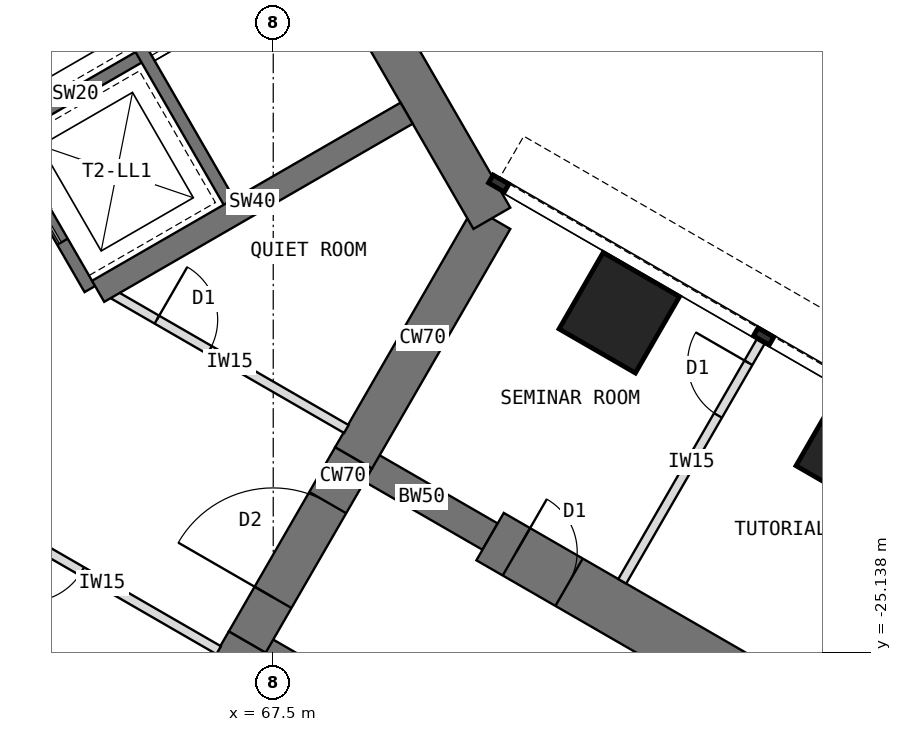
"""IFC4 building model, lengths in metres.
Left out: names, types, materials, properties, quantities, classifications, styles, units other than length and angle.
Written with IfcOpenShell. Run it as: python <this file> out.ifc"""

import sys

from ifc_helpers import new_model, si_unit, direction, frame, frame_2d, origin, origin_2d, place, context, subcontext, project, spatial, rectangle, extrude, element, fill, save


model = new_model("IFC4")
c1 = context("Model", 3, precision=1e-05, world=origin(), true_north=direction((0.0, 1.0)))
c2 = subcontext(c1, "Body", "Model", "MODEL_VIEW")
j1 = project(units=[si_unit("LENGTHUNIT", "METRE"), si_unit("PLANEANGLEUNIT", "RADIAN")], contexts=[c1])
p1 = place(None, origin())
s1 = spatial("IfcSite", under=j1, at=p1, CompositionType="ELEMENT")
p2 = place(p1, origin())
s2 = spatial("IfcBuilding", under=s1, at=p2, CompositionType="ELEMENT")
p3 = place(p2, frame((0.0, 0.0, 60.5)))
s3 = spatial("IfcBuildingStorey", under=s2, at=p3, CompositionType="ELEMENT", Elevation=60.5)
p4 = place(p3, frame((64.798, -28.908, 0.0), z_axis=(0.0, 0.0, 1.0), x_axis=(0.499984222037, 0.866034513004, 0.0)))
e1 = element("IfcWall", 1, at=p4, inside=s3, PredefinedType="SHEAR", context=c2, shape_type="SweptSolid", body=[
    extrude(rectangle(XDim=4.548, YDim=0.7, at=frame_2d((2.274, 0.0))), origin(), (0.0, 0.0, 1.0), 4.0),
])
p5 = place(p3, frame((67.072, -24.97, 0.0), z_axis=(0.0, 0.0, 1.0), x_axis=(0.500010275428, 0.866019471182, 0.0)))
e2 = element("IfcWall", 2, at=p5, inside=s3, PredefinedType="SHEAR", context=c2, shape_type="SweptSolid", body=[
    extrude(rectangle(XDim=3.5, YDim=0.7, at=frame_2d((1.75, 0.0))), origin(), (0.0, 0.0, 1.0), 4.0),
])
p6 = place(p5, frame((0.85, 0.0, 0.0)))
e3 = element("IfcOpeningElement", 3, at=p6, cuts=e2, PredefinedType="OPENING", context=c2, shape_type="SweptSolid", body=[
    extrude(rectangle(XDim=1.8, YDim=2.1, at=frame_2d((0.9, 1.05))), frame((0.0, 0.36, 0.0), z_axis=(0.0, -1.0, 0.0), x_axis=(1.0, 0.0, 0.0)), (0.0, 0.0, 1.0), 0.72),
])
p7 = place(p3, frame((68.822, -21.939, 0.0), z_axis=(0.0, 0.0, 1.0), x_axis=(0.500024481964, 0.866011268655, 0.0)))
e4 = element("IfcWall", 4, at=p7, inside=s3, PredefinedType="SHEAR", context=c2, shape_type="SweptSolid", body=[
    extrude(rectangle(XDim=4.548, YDim=0.7, at=frame_2d((2.274, 0.0))), origin(), (0.0, 0.0, 1.0), 4.0),
])
p8 = place(p3, frame((71.096, -18.0, 0.0), z_axis=(0.0, 0.0, 1.0), x_axis=(-0.500005998175, 0.866021940709, 0.0)))
e5 = element("IfcWall", 5, at=p8, inside=s3, PredefinedType="SHEAR", context=c2, shape_type="SweptSolid", body=[
    extrude(rectangle(XDim=12.596, YDim=0.7, at=frame_2d((6.298, 0.0))), origin(), (0.0, 0.0, 1.0), 4.0),
])
p9 = place(p3, frame((68.822, -21.939, 0.0), z_axis=(0.0, 0.0, 1.0), x_axis=(0.866072649678, -0.499918158782, 0.0)))
e6 = element("IfcWall", 6, at=p9, inside=s3, PredefinedType="SHEAR", context=c2, shape_type="SweptSolid", body=[
    extrude(rectangle(XDim=2.592, YDim=0.5, at=frame_2d((1.296, 0.0))), origin(), (0.0, 0.0, 1.0), 4.0),
])
p10 = place(p3, frame((71.066, -23.234, 0.0), z_axis=(0.0, 0.0, 1.0), x_axis=(0.86602681393, -0.499997557548, 0.0)))
e7 = element("IfcWall", 7, at=p10, inside=s3, PredefinedType="SHEAR", context=c2, shape_type="SweptSolid", body=[
    extrude(rectangle(XDim=9.5, YDim=0.9, at=frame_2d((4.75, 0.0))), origin(), (0.0, 0.0, 1.0), 4.0),
])
p11 = place(p10, frame((0.5, 0.0, 0.0)))
e8 = element("IfcOpeningElement", 8, at=p11, cuts=e7, PredefinedType="OPENING", context=c2, shape_type="SweptSolid", body=[
    extrude(rectangle(XDim=1.0, YDim=2.1, at=frame_2d((0.5, 1.05))), frame((0.0, 0.46, 0.0), z_axis=(0.0, -1.0, 0.0), x_axis=(1.0, 0.0, 0.0)), (0.0, 0.0, 1.0), 0.92),
])
p12 = place(p10, frame((7.25, 0.0, 0.0)))
e9 = element("IfcOpeningElement", 9, at=p12, cuts=e7, PredefinedType="OPENING", context=c2, shape_type="SweptSolid", body=[
    extrude(rectangle(XDim=1.0, YDim=2.1, at=frame_2d((0.5, 1.05))), frame((0.0, 0.46, 0.0), z_axis=(0.0, -1.0, 0.0), x_axis=(1.0, 0.0, 0.0)), (0.0, 0.0, 1.0), 0.92),
])
p13 = place(p3, frame((67.072, -24.97, 0.0), z_axis=(0.0, 0.0, 1.0), x_axis=(0.866031863473, -0.499988811324, 0.0)))
e10 = element("IfcWall", 10, at=p13, inside=s3, PredefinedType="SHEAR", context=c2, shape_type="SweptSolid", body=[
    extrude(rectangle(XDim=2.592, YDim=0.5, at=frame_2d((1.296, 0.0))), origin(), (0.0, 0.0, 1.0), 4.0),
])
for number, where, z_axis, x_axis in (
    (11, (73.191, -19.554, 0.0), (0.0, 0.0, 1.0), (0.5, 0.866, 0.0)),
    (12, (77.088, -21.804, 0.0), (0.0, 0.0, 1.0), (0.5, 0.866, 0.0)),
):
    element("IfcColumn", number, at=place(p3, frame(where, z_axis=z_axis, x_axis=x_axis)), inside=s3, PredefinedType="COLUMN", context=c2, shape_type="SweptSolid", body=[
        extrude(rectangle(XDim=1.45, YDim=1.45, at=origin_2d()), origin(), (0.0, 0.0, 1.0), 4.0),
    ])
p14 = place(p3, frame((64.484, -19.164, 0.0), z_axis=(0.0, 0.0, 1.0), x_axis=(-0.49999894854, 0.866026010844, 0.0)))
e13 = element("IfcWall", 13, at=p14, inside=s3, PredefinedType="SHEAR", context=c2, shape_type="SweptSolid", body=[
    extrude(rectangle(XDim=8.0, YDim=0.2, at=frame_2d((4.0, 0.0))), origin(), (0.0, 0.0, 1.0), 4.0),
])
p15 = place(p14, frame((6.3, 0.0, 0.0)))
e14 = element("IfcOpeningElement", 14, at=p15, cuts=e13, PredefinedType="OPENING", context=c2, shape_type="SweptSolid", body=[
    extrude(rectangle(XDim=1.2, YDim=2.1, at=frame_2d((0.6, 1.05))), frame((0.0, 0.11, 0.0), z_axis=(0.0, -1.0, 0.0), x_axis=(1.0, 0.0, 0.0)), (0.0, 0.0, 1.0), 0.22),
])
p16 = place(p14, frame((0.9, 0.0, 0.0)))
e15 = element("IfcOpeningElement", 15, at=p16, cuts=e13, PredefinedType="OPENING", context=c2, shape_type="SweptSolid", body=[
    extrude(rectangle(XDim=1.1, YDim=2.2, at=frame_2d((0.55, 1.1))), frame((0.0, 0.11, 0.0), z_axis=(0.0, -1.0, 0.0), x_axis=(1.0, 0.0, 0.0)), (0.0, 0.0, 1.0), 0.22),
])
p17 = place(p14, frame((3.8, 0.0, 0.0)))
e16 = element("IfcOpeningElement", 16, at=p17, cuts=e13, PredefinedType="OPENING", context=c2, shape_type="SweptSolid", body=[
    extrude(rectangle(XDim=1.1, YDim=2.2, at=frame_2d((0.55, 1.1))), frame((0.0, 0.11, 0.0), z_axis=(0.0, -1.0, 0.0), x_axis=(1.0, 0.0, 0.0)), (0.0, 0.0, 1.0), 0.22),
])
p18 = place(p3, frame((63.12, -16.603, 0.0), z_axis=(0.0, 0.0, 1.0), x_axis=(0.866062058628, 0.499936506574, 0.0)))
e17 = element("IfcWall", 17, at=p18, inside=s3, PredefinedType="SHEAR", context=c2, shape_type="SweptSolid", body=[
    extrude(rectangle(XDim=2.6, YDim=0.2, at=frame_2d((1.3, 0.0))), origin(), (0.0, 0.0, 1.0), 4.0),
])
p19 = place(p3, frame((66.822, -17.814, 0.0), z_axis=(0.0, 0.0, 1.0), x_axis=(-0.49999894854, 0.866026010844, 0.0)))
e18 = element("IfcWall", 18, at=p19, inside=s3, PredefinedType="SHEAR", context=c2, shape_type="SweptSolid", body=[
    extrude(rectangle(XDim=8.0, YDim=0.2, at=frame_2d((4.0, 0.0))), origin(), (0.0, 0.0, 1.0), 4.0),
])
p20 = place(p19, frame((6.7, 0.0, 0.0)))
e19 = element("IfcOpeningElement", 19, at=p20, cuts=e18, PredefinedType="OPENING", context=c2, shape_type="SweptSolid", body=[
    extrude(rectangle(XDim=1.1, YDim=2.1, at=frame_2d((0.55, 1.05))), frame((0.0, 0.11, 0.0), z_axis=(0.0, -1.0, 0.0), x_axis=(1.0, 0.0, 0.0)), (0.0, 0.0, 1.0), 0.22),
])
p21 = place(p3, frame((64.62, -19.201, 0.0), z_axis=(0.0, 0.0, 1.0), x_axis=(0.866023886965, 0.500002627198, 0.0)))
e20 = element("IfcWall", 20, at=p21, inside=s3, PredefinedType="SHEAR", context=c2, shape_type="SweptSolid", body=[
    extrude(rectangle(XDim=5.858, YDim=0.4, at=frame_2d((2.929, 0.0))), origin(), (0.0, 0.0, 1.0), 4.0),
])
p22 = place(p3, frame((73.24, -23.97, 0.0), z_axis=(0.0, 0.0, 1.0), x_axis=(0.499982560684, 0.866035472144, 0.0)))
e21 = element("IfcWall", 21, at=p22, inside=s3, PredefinedType="PARTITIONING", context=c2, shape_type="SweptSolid", body=[
    extrude(rectangle(XDim=4.55, YDim=0.15, at=frame_2d((2.275, 0.0))), origin(), (0.0, 0.0, 1.0), 3.8),
])
p23 = place(p22, frame((3.15, 0.0, 0.0)))
e22 = element("IfcOpeningElement", 22, at=p23, cuts=e21, PredefinedType="OPENING", context=c2, shape_type="SweptSolid", body=[
    extrude(rectangle(XDim=1.0, YDim=2.1, at=frame_2d((0.5, 1.05))), frame((0.0, 0.085, 0.0), z_axis=(0.0, -1.0, 0.0), x_axis=(1.0, 0.0, 0.0)), (0.0, 0.0, 1.0), 0.17),
])
p24 = place(p3, frame((64.87, -19.253, 0.0), z_axis=(0.0, 0.0, 1.0), x_axis=(0.866021148949, -0.500007369519, 0.0)))
e23 = element("IfcWall", 23, at=p24, inside=s3, PredefinedType="PARTITIONING", context=c2, shape_type="SweptSolid", body=[
    extrude(rectangle(XDim=4.426, YDim=0.15, at=frame_2d((2.213, 0.0))), origin(), (0.0, 0.0, 1.0), 3.8),
])
p25 = place(p24, frame((0.828, 0.0, 0.0)))
e24 = element("IfcOpeningElement", 24, at=p25, cuts=e23, PredefinedType="OPENING", context=c2, shape_type="SweptSolid", body=[
    extrude(rectangle(XDim=1.0, YDim=2.1, at=frame_2d((0.5, 1.05))), frame((0.0, 0.085, 0.0), z_axis=(0.0, -1.0, 0.0), x_axis=(1.0, 0.0, 0.0)), (0.0, 0.0, 1.0), 0.17),
])
p26 = place(p3, frame((66.603, -25.103, 0.0), z_axis=(0.0, 0.0, 1.0), x_axis=(-0.866021148949, 0.500007369519, 0.0)))
e25 = element("IfcWall", 25, at=p26, inside=s3, PredefinedType="PARTITIONING", context=c2, shape_type="SweptSolid", body=[
    extrude(rectangle(XDim=4.426, YDim=0.15, at=frame_2d((2.213, 0.0))), origin(), (0.0, 0.0, 1.0), 3.8),
])
p27 = place(p26, frame((2.598, 0.0, 0.0)))
e26 = element("IfcOpeningElement", 26, at=p27, cuts=e25, PredefinedType="OPENING", context=c2, shape_type="SweptSolid", body=[
    extrude(rectangle(XDim=1.0, YDim=2.1, at=frame_2d((0.5, 1.05))), frame((0.0, 0.085, 0.0), z_axis=(0.0, -1.0, 0.0), x_axis=(1.0, 0.0, 0.0)), (0.0, 0.0, 1.0), 0.17),
])
p28 = place(p16, origin())
e27 = element("IfcDoor", 27, at=p28, inside=s3, OperationType="DOUBLE_DOOR_SLIDING", PredefinedType="DOOR", context=c2, shape_type="SweptSolid", body=[
    extrude(rectangle(XDim=1.1, YDim=2.2, at=frame_2d((0.55, 1.1))), frame((0.0, 0.025, 0.0), z_axis=(0.0, -1.0, 0.0), x_axis=(1.0, 0.0, 0.0)), (0.0, 0.0, 1.0), 0.05),
])
fill(e15, e27)
p29 = place(p6, origin())
e28 = element("IfcDoor", 28, at=p29, inside=s3, OperationType="DOUBLE_DOOR_DOUBLE_SWING", PredefinedType="DOOR", context=c2, shape_type="SweptSolid", body=[
    extrude(rectangle(XDim=1.72, YDim=2.06, at=frame_2d((0.9, 1.03))), frame((0.0, 0.025, 0.0), z_axis=(0.0, -1.0, 0.0), x_axis=(1.0, 0.0, 0.0)), (0.0, 0.0, 1.0), 0.05),
    extrude(rectangle(XDim=0.04, YDim=2.1, at=frame_2d((0.02, 1.05))), frame((0.0, 0.35, 0.0), z_axis=(0.0, -1.0, 0.0), x_axis=(1.0, 0.0, 0.0)), (0.0, 0.0, 1.0), 0.699),
    extrude(rectangle(XDim=0.04, YDim=2.1, at=frame_2d((1.78, 1.05))), frame((0.0, 0.35, 0.0), z_axis=(0.0, -1.0, 0.0), x_axis=(1.0, 0.0, 0.0)), (0.0, 0.0, 1.0), 0.699),
    extrude(rectangle(XDim=1.72, YDim=0.04, at=frame_2d((0.9, 2.08))), frame((0.0, 0.35, 0.0), z_axis=(0.0, -1.0, 0.0), x_axis=(1.0, 0.0, 0.0)), (0.0, 0.0, 1.0), 0.699),
])
fill(e3, e28)
p30 = place(p23, origin())
e29 = element("IfcDoor", 29, at=p30, inside=s3, OperationType="SINGLE_SWING_RIGHT", PredefinedType="DOOR", context=c2, shape_type="SweptSolid", body=[
    extrude(rectangle(XDim=1.0, YDim=2.1, at=frame_2d((0.5, 1.05))), frame((0.0, 0.025, 0.0), z_axis=(0.0, -1.0, 0.0), x_axis=(1.0, 0.0, 0.0)), (0.0, 0.0, 1.0), 0.05),
])
fill(e22, e29)
p31 = place(p27, origin())
e30 = element("IfcDoor", 30, at=p31, inside=s3, OperationType="SINGLE_SWING_RIGHT", PredefinedType="DOOR", context=c2, shape_type="SweptSolid", body=[
    extrude(rectangle(XDim=1.0, YDim=2.1, at=frame_2d((0.5, 1.05))), frame((0.0, 0.025, 0.0), z_axis=(0.0, -1.0, 0.0), x_axis=(1.0, 0.0, 0.0)), (0.0, 0.0, 1.0), 0.05),
])
fill(e26, e30)
p32 = place(p25, origin())
e31 = element("IfcDoor", 31, at=p32, inside=s3, OperationType="SINGLE_SWING_LEFT", PredefinedType="DOOR", context=c2, shape_type="SweptSolid", body=[
    extrude(rectangle(XDim=1.0, YDim=2.1, at=frame_2d((0.5, 1.05))), frame((0.0, 0.025, 0.0), z_axis=(0.0, -1.0, 0.0), x_axis=(1.0, 0.0, 0.0)), (0.0, 0.0, 1.0), 0.05),
])
fill(e24, e31)
p33 = place(p11, origin())
e32 = element("IfcDoor", 32, at=p33, inside=s3, OperationType="SINGLE_SWING_LEFT", PredefinedType="DOOR", context=c2, shape_type="SweptSolid", body=[
    extrude(rectangle(XDim=0.92, YDim=2.06, at=frame_2d((0.5, 1.03))), frame((0.0, 0.025, 0.0), z_axis=(0.0, -1.0, 0.0), x_axis=(1.0, 0.0, 0.0)), (0.0, 0.0, 1.0), 0.05),
    extrude(rectangle(XDim=0.04, YDim=2.1, at=frame_2d((0.02, 1.05))), frame((0.0, 0.45, 0.0), z_axis=(0.0, -1.0, 0.0), x_axis=(1.0, 0.0, 0.0)), (0.0, 0.0, 1.0), 0.899),
    extrude(rectangle(XDim=0.04, YDim=2.1, at=frame_2d((0.98, 1.05))), frame((0.0, 0.45, 0.0), z_axis=(0.0, -1.0, 0.0), x_axis=(1.0, 0.0, 0.0)), (0.0, 0.0, 1.0), 0.899),
    extrude(rectangle(XDim=0.92, YDim=0.04, at=frame_2d((0.5, 2.08))), frame((0.0, 0.45, 0.0), z_axis=(0.0, -1.0, 0.0), x_axis=(1.0, 0.0, 0.0)), (0.0, 0.0, 1.0), 0.899),
])
fill(e8, e32)
save(model, sys.argv[1])
